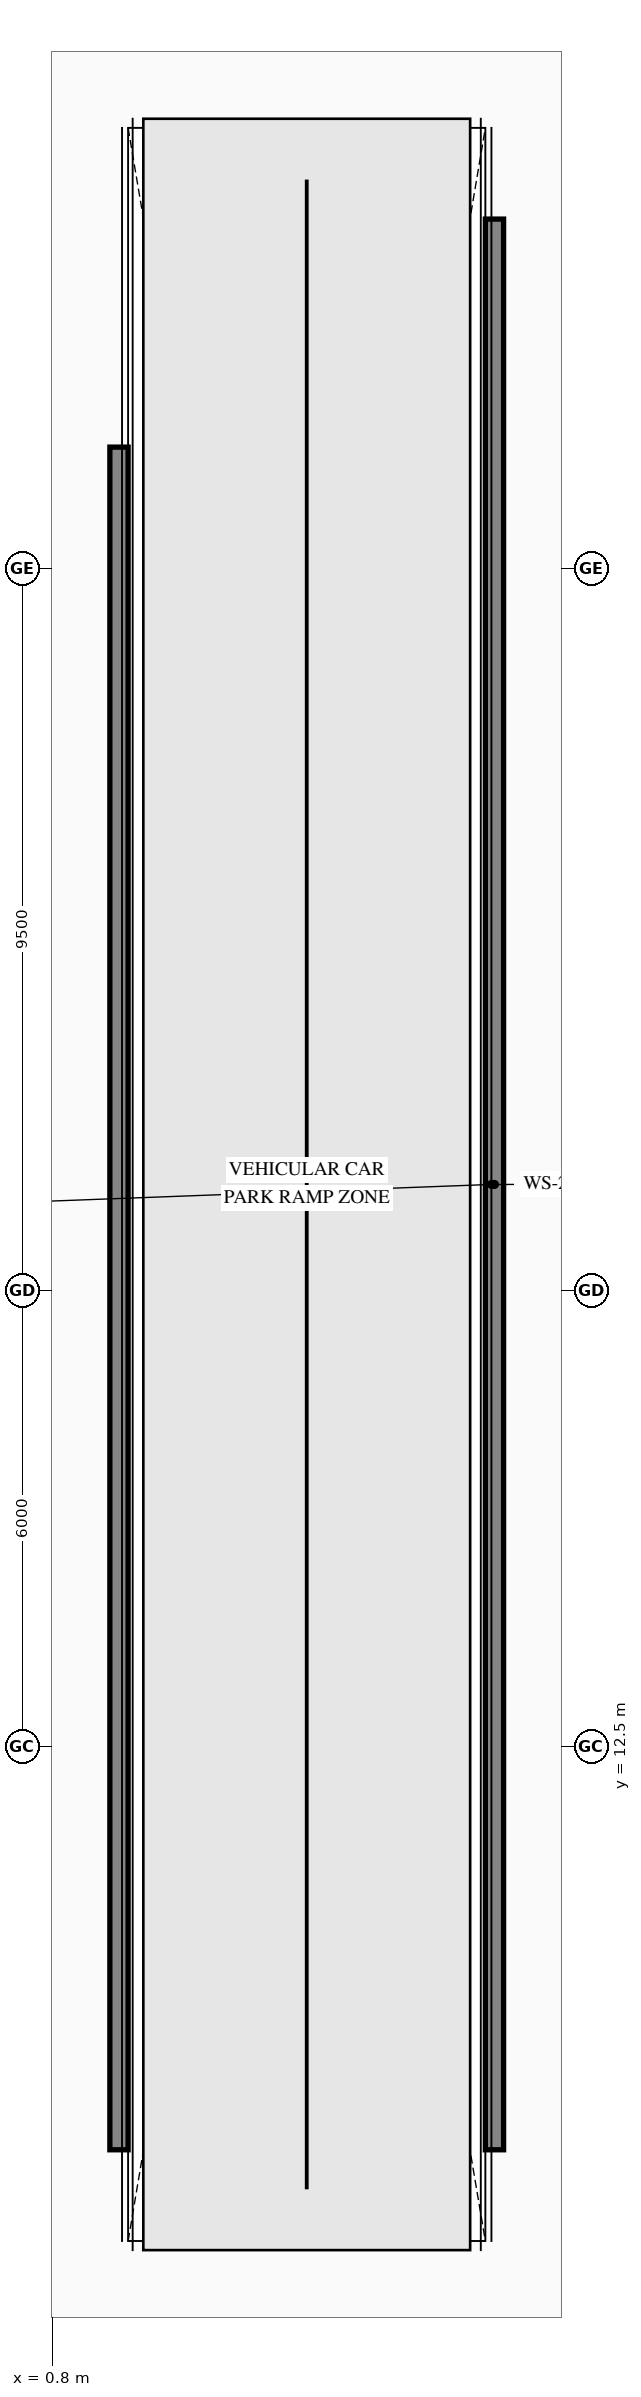
"""IFC4 building model, lengths in metres.
Left out: names, types, materials, properties, quantities, classifications, styles, units other than length and angle.
Written with IfcOpenShell. Run it as: python <this file> out.ifc"""

import sys

from ifc_helpers import new_model, si_unit, direction, frame, frame_2d, origin, place, context, subcontext, project, spatial, rectangle, extrude, element, save


model = new_model("IFC4")
c1 = context("Model", 3, precision=1e-05, world=origin(), true_north=direction((0.0, 1.0)))
c2 = subcontext(c1, "Body", "Model", "MODEL_VIEW")
j1 = project(units=[si_unit("LENGTHUNIT", "METRE"), si_unit("PLANEANGLEUNIT", "RADIAN")], contexts=[c1])
p1 = place(None, origin())
s1 = spatial("IfcSite", under=j1, at=p1, CompositionType="ELEMENT")
p2 = place(p1, origin())
s2 = spatial("IfcBuilding", under=s1, at=p2, CompositionType="ELEMENT")
p3 = place(p2, frame((0.0, 0.0, -9.2)))
s3 = spatial("IfcBuildingStorey", under=s2, at=p3, CompositionType="ELEMENT", Elevation=-9.2)
p4 = place(p3, frame((1.68, 7.2, 0.0), z_axis=(0.0, 0.0, 1.0), x_axis=(0.0, 1.0, 0.0)))
e1 = element("IfcWall", 1, at=p4, inside=s3, PredefinedType="SOLIDWALL", context=c2, shape_type="SweptSolid", body=[
    extrude(rectangle(XDim=22.4, YDim=0.24, at=frame_2d((11.2, 0.0))), origin(), (0.0, 0.0, 1.0), 4.6),
])
p5 = place(p3, frame((6.62, 7.2, 0.0), z_axis=(0.0, 0.0, 1.0), x_axis=(0.0, 1.0, 0.0)))
e2 = element("IfcWall", 2, at=p5, inside=s3, PredefinedType="SOLIDWALL", context=c2, shape_type="SweptSolid", body=[
    extrude(rectangle(XDim=25.4, YDim=0.24, at=frame_2d((12.7, 0.0))), origin(), (0.0, 0.0, 1.0), 4.6),
])
save(model, sys.argv[1])
